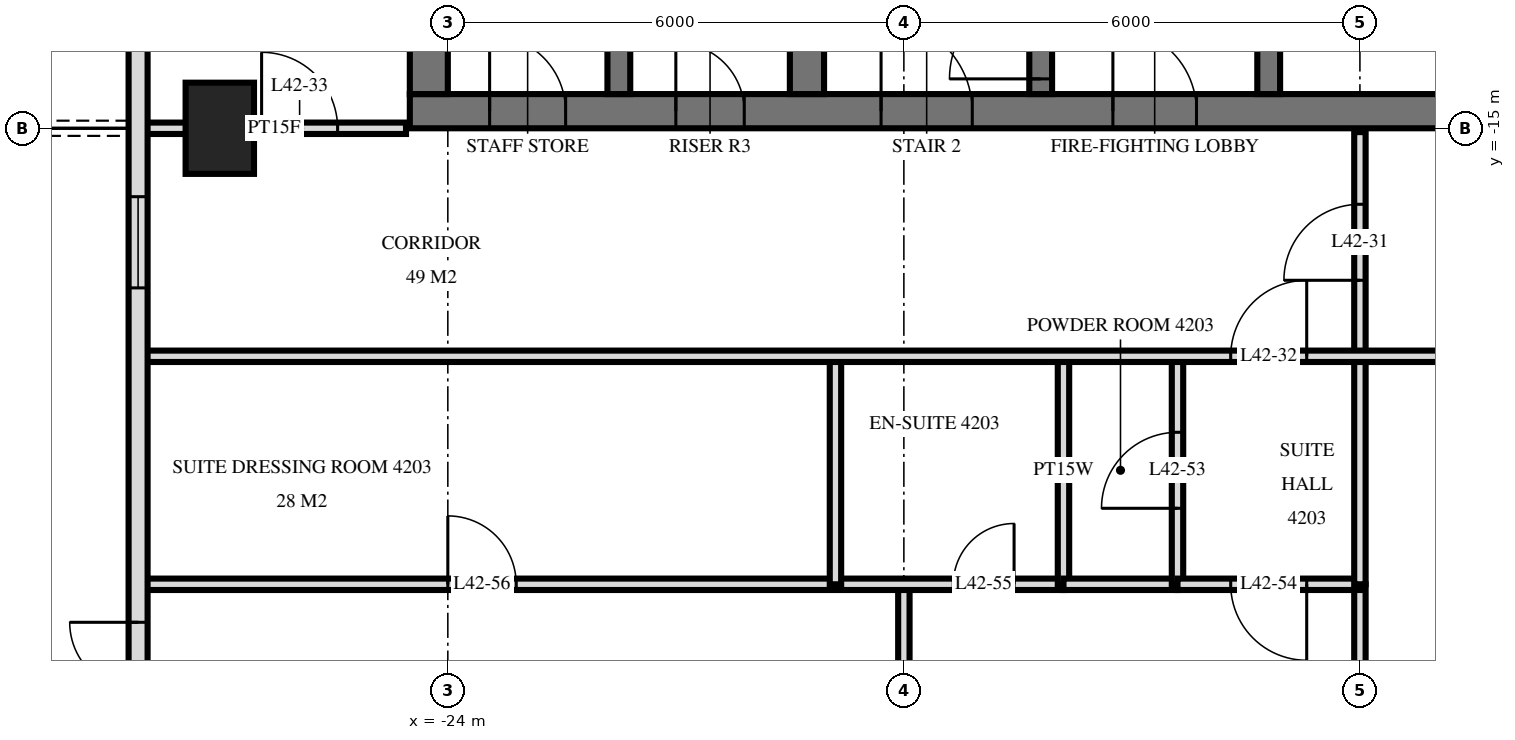
"""IFC4 building model, lengths in metres.
Left out: names, types, materials, properties, quantities, classifications, styles, units other than length and angle.
Written with IfcOpenShell. Run it as: python <this file> out.ifc"""

import sys

from ifc_helpers import new_model, si_unit, direction, frame, frame_2d, origin, origin_2d, place, context, subcontext, project, spatial, rectangle, extrude, element, fill, save


model = new_model("IFC4")
c1 = context("Model", 3, precision=1e-05, world=origin(), true_north=direction((0.0, 1.0)))
c2 = subcontext(c1, "Body", "Model", "MODEL_VIEW")
j1 = project(units=[si_unit("LENGTHUNIT", "METRE"), si_unit("PLANEANGLEUNIT", "RADIAN")], contexts=[c1])
p1 = place(None, origin())
s1 = spatial("IfcSite", under=j1, at=p1, CompositionType="ELEMENT")
p2 = place(p1, origin())
s2 = spatial("IfcBuilding", under=s1, at=p2, CompositionType="ELEMENT")
p3 = place(p2, frame((0.0, 0.0, 163.2)))
s3 = spatial("IfcBuildingStorey", under=s2, at=p3, CompositionType="ELEMENT", Elevation=163.2)
p4 = place(p3, frame((-27.0, -15.0, 0.0), z_axis=(0.0, 0.0, 1.0), x_axis=(0.0, 1.0, 0.0)))
e1 = element("IfcColumn", 1, at=p4, inside=s3, PredefinedType="COLUMN", context=c2, shape_type="SweptSolid", body=[
    extrude(rectangle(XDim=1.2, YDim=0.9, at=origin_2d()), origin(), (0.0, 0.0, 1.0), 3.6),
])
p5 = place(p3, frame((-24.5, -14.775, 0.0), z_axis=(0.0, 0.0, 1.0), x_axis=(1.0, 0.0, 0.0)))
e2 = element("IfcWall", 2, at=p5, inside=s3, PredefinedType="SHEAR", context=c2, shape_type="SweptSolid", body=[
    extrude(rectangle(XDim=14.5, YDim=0.45, at=frame_2d((7.25, 0.0))), origin(), (0.0, 0.0, 1.0), 3.6),
])
p6 = place(p5, frame((6.2, 0.0, 0.0)))
e3 = element("IfcOpeningElement", 3, at=p6, cuts=e2, PredefinedType="OPENING", context=c2, shape_type="SweptSolid", body=[
    extrude(rectangle(XDim=1.2, YDim=2.1, at=frame_2d((0.6, 1.05))), frame((0.0, 0.235, 0.0), z_axis=(0.0, -1.0, 0.0), x_axis=(1.0, 0.0, 0.0)), (0.0, 0.0, 1.0), 0.47),
])
p7 = place(p5, frame((9.25, 0.0, 0.0)))
e4 = element("IfcOpeningElement", 4, at=p7, cuts=e2, PredefinedType="OPENING", context=c2, shape_type="SweptSolid", body=[
    extrude(rectangle(XDim=1.1, YDim=2.1, at=frame_2d((0.55, 1.05))), frame((0.0, 0.235, 0.0), z_axis=(0.0, -1.0, 0.0), x_axis=(1.0, 0.0, 0.0)), (0.0, 0.0, 1.0), 0.47),
])
p8 = place(p5, frame((3.5, 0.0, 0.0)))
e5 = element("IfcOpeningElement", 5, at=p8, cuts=e2, PredefinedType="OPENING", context=c2, shape_type="SweptSolid", body=[
    extrude(rectangle(XDim=0.9, YDim=2.1, at=frame_2d((0.45, 1.05))), frame((0.0, 0.235, 0.0), z_axis=(0.0, -1.0, 0.0), x_axis=(1.0, 0.0, 0.0)), (0.0, 0.0, 1.0), 0.47),
])
p9 = place(p5, frame((1.05, 0.0, 0.0)))
e6 = element("IfcOpeningElement", 6, at=p9, cuts=e2, PredefinedType="OPENING", context=c2, shape_type="SweptSolid", body=[
    extrude(rectangle(XDim=1.0, YDim=2.1, at=frame_2d((0.5, 1.05))), frame((0.0, 0.235, 0.0), z_axis=(0.0, -1.0, 0.0), x_axis=(1.0, 0.0, 0.0)), (0.0, 0.0, 1.0), 0.47),
])
p10 = place(p3, frame((-24.25, -14.55, 0.0), z_axis=(0.0, 0.0, 1.0), x_axis=(0.0, 1.0, 0.0)))
e7 = element("IfcWall", 7, at=p10, inside=s3, PredefinedType="SHEAR", context=c2, shape_type="SweptSolid", body=[
    extrude(rectangle(XDim=14.1, YDim=0.5, at=frame_2d((7.05, 0.0))), origin(), (0.0, 0.0, 1.0), 3.6),
])
p11 = place(p3, frame((-13.2, -14.55, 0.0), z_axis=(0.0, 0.0, 1.0), x_axis=(0.0, 1.0, 0.0)))
e8 = element("IfcWall", 8, at=p11, inside=s3, PredefinedType="SHEAR", context=c2, shape_type="SweptSolid", body=[
    extrude(rectangle(XDim=5.4, YDim=0.3, at=frame_2d((2.7, 0.0))), origin(), (0.0, 0.0, 1.0), 3.6),
])
p12 = place(p11, frame((4.0, 0.0, 0.0)))
e9 = element("IfcOpeningElement", 9, at=p12, cuts=e8, PredefinedType="OPENING", context=c2, shape_type="SweptSolid", body=[
    extrude(rectangle(XDim=1.2, YDim=2.1, at=frame_2d((0.6, 1.05))), frame((0.0, 0.16, 0.0), z_axis=(0.0, -1.0, 0.0), x_axis=(1.0, 0.0, 0.0)), (0.0, 0.0, 1.0), 0.32),
])
p13 = place(p3, frame((-16.2, -14.55, 0.0), z_axis=(0.0, 0.0, 1.0), x_axis=(0.0, 1.0, 0.0)))
e10 = element("IfcWall", 10, at=p13, inside=s3, PredefinedType="SHEAR", context=c2, shape_type="SweptSolid", body=[
    extrude(rectangle(XDim=5.4, YDim=0.3, at=frame_2d((2.7, 0.0))), origin(), (0.0, 0.0, 1.0), 3.6),
])
p14 = place(p13, frame((0.2, 0.0, 0.0)))
e11 = element("IfcOpeningElement", 11, at=p14, cuts=e10, PredefinedType="OPENING", context=c2, shape_type="SweptSolid", body=[
    extrude(rectangle(XDim=1.2, YDim=2.1, at=frame_2d((0.6, 1.05))), frame((0.0, 0.16, 0.0), z_axis=(0.0, -1.0, 0.0), x_axis=(1.0, 0.0, 0.0)), (0.0, 0.0, 1.0), 0.32),
])
p15 = place(p3, frame((-19.275, -14.55, 0.0), z_axis=(0.0, 0.0, 1.0), x_axis=(0.0, 1.0, 0.0)))
e12 = element("IfcWall", 12, at=p15, inside=s3, PredefinedType="SHEAR", context=c2, shape_type="SweptSolid", body=[
    extrude(rectangle(XDim=5.4, YDim=0.45, at=frame_2d((2.7, 0.0))), origin(), (0.0, 0.0, 1.0), 3.6),
])
p16 = place(p3, frame((-21.75, -14.55, 0.0), z_axis=(0.0, 0.0, 1.0), x_axis=(0.0, 1.0, 0.0)))
e13 = element("IfcWall", 13, at=p16, inside=s3, PredefinedType="SHEAR", context=c2, shape_type="SweptSolid", body=[
    extrude(rectangle(XDim=5.4, YDim=0.3, at=frame_2d((2.7, 0.0))), origin(), (0.0, 0.0, 1.0), 3.6),
])
p17 = place(p3, frame((-28.075, -3.325, 0.0), z_axis=(0.0, 0.0, 1.0), x_axis=(0.0, -1.0, 0.0)))
e14 = element("IfcWall", 14, at=p17, inside=s3, PredefinedType="SOLIDWALL", context=c2, shape_type="SweptSolid", body=[
    extrude(rectangle(XDim=25.951, YDim=0.25, at=frame_2d((12.975, 0.0))), origin(), (0.0, 0.0, 1.0), 3.32),
])
p18 = place(p17, frame((6.65, 0.0, 0.0)))
e15 = element("IfcOpeningElement", 15, at=p18, cuts=e14, PredefinedType="OPENING", context=c2, shape_type="SweptSolid", body=[
    extrude(rectangle(XDim=1.8, YDim=2.4, at=frame_2d((0.9, 1.2))), frame((0.0, 0.135, 0.0), z_axis=(0.0, -1.0, 0.0), x_axis=(1.0, 0.0, 0.0)), (0.0, 0.0, 1.0), 0.27),
])
p19 = place(p17, frame((12.575, 0.0, 0.3)))
e16 = element("IfcOpeningElement", 16, at=p19, cuts=e14, PredefinedType="OPENING", context=c2, shape_type="SweptSolid", body=[
    extrude(rectangle(XDim=1.2, YDim=2.1, at=frame_2d((0.6, 1.05))), frame((0.0, 0.135, 0.0), z_axis=(0.0, -1.0, 0.0), x_axis=(1.0, 0.0, 0.0)), (0.0, 0.0, 1.0), 0.27),
])
p20 = place(p17, frame((18.175, 0.0, 0.0)))
e17 = element("IfcOpeningElement", 17, at=p20, cuts=e14, PredefinedType="OPENING", context=c2, shape_type="SweptSolid", body=[
    extrude(rectangle(XDim=1.8, YDim=2.4, at=frame_2d((0.9, 1.2))), frame((0.0, 0.135, 0.0), z_axis=(0.0, -1.0, 0.0), x_axis=(1.0, 0.0, 0.0)), (0.0, 0.0, 1.0), 0.27),
])
p21 = place(p17, frame((21.075, 0.0, 0.0)))
e18 = element("IfcOpeningElement", 18, at=p21, cuts=e14, PredefinedType="OPENING", context=c2, shape_type="SweptSolid", body=[
    extrude(rectangle(XDim=1.8, YDim=2.4, at=frame_2d((0.9, 1.2))), frame((0.0, 0.135, 0.0), z_axis=(0.0, -1.0, 0.0), x_axis=(1.0, 0.0, 0.0)), (0.0, 0.0, 1.0), 0.27),
])
p22 = place(p17, frame((23.825, 0.0, 0.3)))
e19 = element("IfcOpeningElement", 19, at=p22, cuts=e14, PredefinedType="OPENING", context=c2, shape_type="SweptSolid", body=[
    extrude(rectangle(XDim=1.8, YDim=2.1, at=frame_2d((0.9, 1.05))), frame((0.0, 0.135, 0.0), z_axis=(0.0, -1.0, 0.0), x_axis=(1.0, 0.0, 0.0)), (0.0, 0.0, 1.0), 0.27),
])
p23 = place(p3, frame((-12.0, -21.0, 0.0), z_axis=(0.0, 0.0, 1.0), x_axis=(0.0, 1.0, 0.0)))
e20 = element("IfcWall", 20, at=p23, inside=s3, PredefinedType="PARTITIONING", context=c2, shape_type="SweptSolid", body=[
    extrude(rectangle(XDim=5.95, YDim=0.15, at=frame_2d((2.975, 0.0))), origin(), (0.0, 0.0, 1.0), 3.32),
])
p24 = place(p23, frame((4.0, 0.0, 0.0)))
e21 = element("IfcOpeningElement", 21, at=p24, cuts=e20, PredefinedType="OPENING", context=c2, shape_type="SweptSolid", body=[
    extrude(rectangle(XDim=1.0, YDim=2.1, at=frame_2d((0.5, 1.05))), frame((0.0, 0.085, 0.0), z_axis=(0.0, -1.0, 0.0), x_axis=(1.0, 0.0, 0.0)), (0.0, 0.0, 1.0), 0.17),
])
p25 = place(p3, frame((-12.0, -33.62, 0.0), z_axis=(0.0, 0.0, 1.0), x_axis=(0.0, 1.0, 0.0)))
e22 = element("IfcWall", 22, at=p25, inside=s3, PredefinedType="PARTITIONING", context=c2, shape_type="SweptSolid", body=[
    extrude(rectangle(XDim=12.62, YDim=0.15, at=frame_2d((6.31, 0.0))), origin(), (0.0, 0.0, 1.0), 3.32),
])
p26 = place(p3, frame((-14.4, -21.0, 0.0), z_axis=(0.0, 0.0, 1.0), x_axis=(0.0, 1.0, 0.0)))
e23 = element("IfcWall", 23, at=p26, inside=s3, PredefinedType="PARTITIONING", context=c2, shape_type="SweptSolid", body=[
    extrude(rectangle(XDim=3.0, YDim=0.15, at=frame_2d((1.5, 0.0))), origin(), (0.0, 0.0, 1.0), 3.32),
])
p27 = place(p26, frame((1.0, 0.0, 0.0)))
e24 = element("IfcOpeningElement", 24, at=p27, cuts=e23, PredefinedType="OPENING", context=c2, shape_type="SweptSolid", body=[
    extrude(rectangle(XDim=1.0, YDim=2.1, at=frame_2d((0.5, 1.05))), frame((0.0, 0.085, 0.0), z_axis=(0.0, -1.0, 0.0), x_axis=(1.0, 0.0, 0.0)), (0.0, 0.0, 1.0), 0.17),
])
p28 = place(p3, frame((-15.9, -21.0, 0.0), z_axis=(0.0, 0.0, 1.0), x_axis=(0.0, 1.0, 0.0)))
e25 = element("IfcWall", 25, at=p28, inside=s3, PredefinedType="PLUMBINGWALL", context=c2, shape_type="SweptSolid", body=[
    extrude(rectangle(XDim=3.0, YDim=0.15, at=frame_2d((1.5, 0.0))), origin(), (0.0, 0.0, 1.0), 3.32),
])
p29 = place(p3, frame((-18.0, -33.62, 0.0), z_axis=(0.0, 0.0, 1.0), x_axis=(0.0, 1.0, 0.0)))
e26 = element("IfcWall", 26, at=p29, inside=s3, PredefinedType="PARTITIONING", context=c2, shape_type="SweptSolid", body=[
    extrude(rectangle(XDim=12.62, YDim=0.15, at=frame_2d((6.31, 0.0))), origin(), (0.0, 0.0, 1.0), 3.32),
])
p30 = place(p29, frame((5.79, 0.0, 0.0)))
e27 = element("IfcOpeningElement", 27, at=p30, cuts=e26, PredefinedType="OPENING", context=c2, shape_type="SweptSolid", body=[
    extrude(rectangle(XDim=0.9, YDim=2.1, at=frame_2d((0.45, 1.05))), frame((0.0, 0.085, 0.0), z_axis=(0.0, -1.0, 0.0), x_axis=(1.0, 0.0, 0.0)), (0.0, 0.0, 1.0), 0.17),
])
p31 = place(p3, frame((-18.9, -21.0, 0.0), z_axis=(0.0, 0.0, 1.0), x_axis=(0.0, 1.0, 0.0)))
e28 = element("IfcWall", 28, at=p31, inside=s3, PredefinedType="PARTITIONING", context=c2, shape_type="SweptSolid", body=[
    extrude(rectangle(XDim=3.0, YDim=0.15, at=frame_2d((1.5, 0.0))), origin(), (0.0, 0.0, 1.0), 3.32),
])
p32 = place(p3, frame((-14.4, -21.0, 0.0), z_axis=(0.0, 0.0, 1.0), x_axis=(1.0, 0.0, 0.0)))
e29 = element("IfcWall", 29, at=p32, inside=s3, PredefinedType="PARTITIONING", context=c2, shape_type="SweptSolid", body=[
    extrude(rectangle(XDim=2.4, YDim=0.15, at=frame_2d((1.2, 0.0))), origin(), (0.0, 0.0, 1.0), 3.32),
])
p33 = place(p32, frame((0.7, 0.0, 0.0)))
e30 = element("IfcOpeningElement", 30, at=p33, cuts=e29, PredefinedType="OPENING", context=c2, shape_type="SweptSolid", body=[
    extrude(rectangle(XDim=1.0, YDim=2.1, at=frame_2d((0.5, 1.05))), frame((0.0, 0.085, 0.0), z_axis=(0.0, -1.0, 0.0), x_axis=(1.0, 0.0, 0.0)), (0.0, 0.0, 1.0), 0.17),
])
p34 = place(p3, frame((-28.02, -21.0, 0.0), z_axis=(0.0, 0.0, 1.0), x_axis=(1.0, 0.0, 0.0)))
e31 = element("IfcWall", 31, at=p34, inside=s3, PredefinedType="PARTITIONING", context=c2, shape_type="SweptSolid", body=[
    extrude(rectangle(XDim=12.12, YDim=0.15, at=frame_2d((6.06, 0.0))), origin(), (0.0, 0.0, 1.0), 3.32),
])
p35 = place(p34, frame((10.67, 0.0, 0.0)))
e32 = element("IfcOpeningElement", 32, at=p35, cuts=e31, PredefinedType="OPENING", context=c2, shape_type="SweptSolid", body=[
    extrude(rectangle(XDim=0.8, YDim=2.1, at=frame_2d((0.4, 1.05))), frame((0.0, 0.085, 0.0), z_axis=(0.0, -1.0, 0.0), x_axis=(1.0, 0.0, 0.0)), (0.0, 0.0, 1.0), 0.17),
])
p36 = place(p34, frame((4.02, 0.0, 0.0)))
e33 = element("IfcOpeningElement", 33, at=p36, cuts=e31, PredefinedType="OPENING", context=c2, shape_type="SweptSolid", body=[
    extrude(rectangle(XDim=0.9, YDim=2.1, at=frame_2d((0.45, 1.05))), frame((0.0, 0.085, 0.0), z_axis=(0.0, -1.0, 0.0), x_axis=(1.0, 0.0, 0.0)), (0.0, 0.0, 1.0), 0.17),
])
p37 = place(p3, frame((-15.9, -21.0, 0.0), z_axis=(0.0, 0.0, 1.0), x_axis=(1.0, 0.0, 0.0)))
e34 = element("IfcWall", 34, at=p37, inside=s3, PredefinedType="PLUMBINGWALL", context=c2, shape_type="SweptSolid", body=[
    extrude(rectangle(XDim=1.5, YDim=0.15, at=frame_2d((0.75, 0.0))), origin(), (0.0, 0.0, 1.0), 3.32),
])
p38 = place(p3, frame((-28.02, -18.0, 0.0), z_axis=(0.0, 0.0, 1.0), x_axis=(1.0, 0.0, 0.0)))
e35 = element("IfcWall", 35, at=p38, inside=s3, PredefinedType="PARTITIONING", context=c2, shape_type="SweptSolid", body=[
    extrude(rectangle(XDim=56.04, YDim=0.15, at=frame_2d((28.02, 0.0))), origin(), (0.0, 0.0, 1.0), 3.32),
])
p39 = place(p38, frame((14.32, 0.0, 0.0)))
e36 = element("IfcOpeningElement", 36, at=p39, cuts=e35, PredefinedType="OPENING", context=c2, shape_type="SweptSolid", body=[
    extrude(rectangle(XDim=1.0, YDim=2.1, at=frame_2d((0.5, 1.05))), frame((0.0, 0.085, 0.0), z_axis=(0.0, -1.0, 0.0), x_axis=(1.0, 0.0, 0.0)), (0.0, 0.0, 1.0), 0.17),
])
p40 = place(p38, frame((40.17, 0.0, 0.0)))
e37 = element("IfcOpeningElement", 37, at=p40, cuts=e35, PredefinedType="OPENING", context=c2, shape_type="SweptSolid", body=[
    extrude(rectangle(XDim=1.0, YDim=2.1, at=frame_2d((0.5, 1.05))), frame((0.0, 0.085, 0.0), z_axis=(0.0, -1.0, 0.0), x_axis=(1.0, 0.0, 0.0)), (0.0, 0.0, 1.0), 0.17),
])
p41 = place(p38, frame((44.87, 0.0, 0.0)))
e38 = element("IfcOpeningElement", 38, at=p41, cuts=e35, PredefinedType="OPENING", context=c2, shape_type="SweptSolid", body=[
    extrude(rectangle(XDim=1.0, YDim=2.1, at=frame_2d((0.5, 1.05))), frame((0.0, 0.085, 0.0), z_axis=(0.0, -1.0, 0.0), x_axis=(1.0, 0.0, 0.0)), (0.0, 0.0, 1.0), 0.17),
])
p42 = place(p38, frame((46.72, 0.0, 0.0)))
e39 = element("IfcOpeningElement", 39, at=p42, cuts=e35, PredefinedType="OPENING", context=c2, shape_type="SweptSolid", body=[
    extrude(rectangle(XDim=1.0, YDim=2.1, at=frame_2d((0.5, 1.05))), frame((0.0, 0.085, 0.0), z_axis=(0.0, -1.0, 0.0), x_axis=(1.0, 0.0, 0.0)), (0.0, 0.0, 1.0), 0.17),
])
p43 = place(p38, frame((18.52, 0.0, 0.0)))
e40 = element("IfcOpeningElement", 40, at=p43, cuts=e35, PredefinedType="OPENING", context=c2, shape_type="SweptSolid", body=[
    extrude(rectangle(XDim=1.0, YDim=2.1, at=frame_2d((0.5, 1.05))), frame((0.0, 0.085, 0.0), z_axis=(0.0, -1.0, 0.0), x_axis=(1.0, 0.0, 0.0)), (0.0, 0.0, 1.0), 0.17),
])
p44 = place(p38, frame((24.52, 0.0, 0.0)))
e41 = element("IfcOpeningElement", 41, at=p44, cuts=e35, PredefinedType="OPENING", context=c2, shape_type="SweptSolid", body=[
    extrude(rectangle(XDim=1.0, YDim=2.1, at=frame_2d((0.5, 1.05))), frame((0.0, 0.085, 0.0), z_axis=(0.0, -1.0, 0.0), x_axis=(1.0, 0.0, 0.0)), (0.0, 0.0, 1.0), 0.17),
])
p45 = place(p38, frame((30.52, 0.0, 0.0)))
e42 = element("IfcOpeningElement", 42, at=p45, cuts=e35, PredefinedType="OPENING", context=c2, shape_type="SweptSolid", body=[
    extrude(rectangle(XDim=1.0, YDim=2.1, at=frame_2d((0.5, 1.05))), frame((0.0, 0.085, 0.0), z_axis=(0.0, -1.0, 0.0), x_axis=(1.0, 0.0, 0.0)), (0.0, 0.0, 1.0), 0.17),
])
p46 = place(p38, frame((36.52, 0.0, 0.0)))
e43 = element("IfcOpeningElement", 43, at=p46, cuts=e35, PredefinedType="OPENING", context=c2, shape_type="SweptSolid", body=[
    extrude(rectangle(XDim=1.0, YDim=2.1, at=frame_2d((0.5, 1.05))), frame((0.0, 0.085, 0.0), z_axis=(0.0, -1.0, 0.0), x_axis=(1.0, 0.0, 0.0)), (0.0, 0.0, 1.0), 0.17),
])
p47 = place(p3, frame((-28.02, -15.0, 0.0), z_axis=(0.0, 0.0, 1.0), x_axis=(1.0, 0.0, 0.0)))
e44 = element("IfcWall", 44, at=p47, inside=s3, PredefinedType="PARTITIONING", context=c2, shape_type="SweptSolid", body=[
    extrude(rectangle(XDim=3.47, YDim=0.15, at=frame_2d((1.735, 0.0))), origin(), (0.0, 0.0, 1.0), 3.32),
])
p48 = place(p47, frame((1.57, 0.0, 0.0)))
e45 = element("IfcOpeningElement", 45, at=p48, cuts=e44, PredefinedType="OPENING", context=c2, shape_type="SweptSolid", body=[
    extrude(rectangle(XDim=1.0, YDim=2.1, at=frame_2d((0.5, 1.05))), frame((0.0, 0.085, 0.0), z_axis=(0.0, -1.0, 0.0), x_axis=(1.0, 0.0, 0.0)), (0.0, 0.0, 1.0), 0.17),
])
p49 = place(p19, origin())
e46 = element("IfcWindow", 46, at=p49, inside=s3, PartitioningType="SINGLE_PANEL", PredefinedType="WINDOW", context=c2, shape_type="SweptSolid", body=[
    extrude(rectangle(XDim=1.2, YDim=2.1, at=frame_2d((0.6, 1.05))), frame((0.0, 0.03, 0.0), z_axis=(0.0, -1.0, 0.0), x_axis=(1.0, 0.0, 0.0)), (0.0, 0.0, 1.0), 0.06),
])
fill(e16, e46)
p50 = place(p20, frame((0.9, 0.0, 0.0), z_axis=(0.0, 0.0, 1.0), x_axis=(-1.0, 0.0, 0.0)))
e47 = element("IfcDoor", 47, at=p50, inside=s3, OperationType="DOUBLE_DOOR_SINGLE_SWING", PredefinedType="DOOR", context=c2, shape_type="SweptSolid", body=[
    extrude(rectangle(XDim=1.8, YDim=2.4, at=frame_2d((0.0, 1.2))), frame((0.0, -0.025, 0.0), z_axis=(0.0, 1.0, 0.0), x_axis=(-1.0, 0.0, 0.0)), (0.0, 0.0, 1.0), 0.05),
])
fill(e17, e47)
p51 = place(p6, origin())
e48 = element("IfcDoor", 48, at=p51, inside=s3, OperationType="SINGLE_SWING_RIGHT", PredefinedType="DOOR", context=c2, shape_type="SweptSolid", body=[
    extrude(rectangle(XDim=1.2, YDim=2.1, at=frame_2d((0.6, 1.05))), frame((0.0, 0.025, 0.0), z_axis=(0.0, -1.0, 0.0), x_axis=(1.0, 0.0, 0.0)), (0.0, 0.0, 1.0), 0.05),
])
fill(e3, e48)
p52 = place(p7, origin())
e49 = element("IfcDoor", 49, at=p52, inside=s3, OperationType="SINGLE_SWING_RIGHT", PredefinedType="DOOR", context=c2, shape_type="SweptSolid", body=[
    extrude(rectangle(XDim=1.1, YDim=2.1, at=frame_2d((0.55, 1.05))), frame((0.0, 0.025, 0.0), z_axis=(0.0, -1.0, 0.0), x_axis=(1.0, 0.0, 0.0)), (0.0, 0.0, 1.0), 0.05),
])
fill(e4, e49)
p53 = place(p8, origin())
e50 = element("IfcDoor", 50, at=p53, inside=s3, OperationType="SINGLE_SWING_RIGHT", PredefinedType="DOOR", context=c2, shape_type="SweptSolid", body=[
    extrude(rectangle(XDim=0.9, YDim=2.1, at=frame_2d((0.45, 1.05))), frame((0.0, 0.025, 0.0), z_axis=(0.0, -1.0, 0.0), x_axis=(1.0, 0.0, 0.0)), (0.0, 0.0, 1.0), 0.05),
])
fill(e5, e50)
p54 = place(p9, origin())
e51 = element("IfcDoor", 51, at=p54, inside=s3, OperationType="SINGLE_SWING_RIGHT", PredefinedType="DOOR", context=c2, shape_type="SweptSolid", body=[
    extrude(rectangle(XDim=1.0, YDim=2.1, at=frame_2d((0.5, 1.05))), frame((0.0, 0.025, 0.0), z_axis=(0.0, -1.0, 0.0), x_axis=(1.0, 0.0, 0.0)), (0.0, 0.0, 1.0), 0.05),
])
fill(e6, e51)
p55 = place(p14, origin())
e52 = element("IfcDoor", 52, at=p55, inside=s3, OperationType="SINGLE_SWING_RIGHT", PredefinedType="DOOR", context=c2, shape_type="SweptSolid", body=[
    extrude(rectangle(XDim=1.2, YDim=2.1, at=frame_2d((0.6, 1.05))), frame((0.0, 0.025, 0.0), z_axis=(0.0, -1.0, 0.0), x_axis=(1.0, 0.0, 0.0)), (0.0, 0.0, 1.0), 0.05),
])
fill(e11, e52)
p56 = place(p24, origin())
e53 = element("IfcDoor", 53, at=p56, inside=s3, OperationType="SINGLE_SWING_RIGHT", PredefinedType="DOOR", context=c2, shape_type="SweptSolid", body=[
    extrude(rectangle(XDim=1.0, YDim=2.1, at=frame_2d((0.5, 1.05))), frame((0.0, 0.025, 0.0), z_axis=(0.0, -1.0, 0.0), x_axis=(1.0, 0.0, 0.0)), (0.0, 0.0, 1.0), 0.05),
])
fill(e21, e53)
p57 = place(p39, origin())
e54 = element("IfcDoor", 54, at=p57, inside=s3, OperationType="SINGLE_SWING_LEFT", PredefinedType="DOOR", context=c2, shape_type="SweptSolid", body=[
    extrude(rectangle(XDim=1.0, YDim=2.1, at=frame_2d((0.5, 1.05))), frame((0.0, 0.025, 0.0), z_axis=(0.0, -1.0, 0.0), x_axis=(1.0, 0.0, 0.0)), (0.0, 0.0, 1.0), 0.05),
])
fill(e36, e54)
p58 = place(p48, origin())
e55 = element("IfcDoor", 55, at=p58, inside=s3, OperationType="SINGLE_SWING_RIGHT", PredefinedType="DOOR", context=c2, shape_type="SweptSolid", body=[
    extrude(rectangle(XDim=1.0, YDim=2.1, at=frame_2d((0.5, 1.05))), frame((0.0, 0.025, 0.0), z_axis=(0.0, -1.0, 0.0), x_axis=(1.0, 0.0, 0.0)), (0.0, 0.0, 1.0), 0.05),
])
fill(e45, e55)
p59 = place(p27, origin())
e56 = element("IfcDoor", 56, at=p59, inside=s3, OperationType="SINGLE_SWING_RIGHT", PredefinedType="DOOR", context=c2, shape_type="SweptSolid", body=[
    extrude(rectangle(XDim=1.0, YDim=2.1, at=frame_2d((0.5, 1.05))), frame((0.0, 0.025, 0.0), z_axis=(0.0, -1.0, 0.0), x_axis=(1.0, 0.0, 0.0)), (0.0, 0.0, 1.0), 0.05),
])
fill(e24, e56)
p60 = place(p33, frame((0.5, 0.0, 0.0), z_axis=(0.0, 0.0, 1.0), x_axis=(-1.0, 0.0, 0.0)))
e57 = element("IfcDoor", 57, at=p60, inside=s3, OperationType="SINGLE_SWING_RIGHT", PredefinedType="DOOR", context=c2, shape_type="SweptSolid", body=[
    extrude(rectangle(XDim=1.0, YDim=2.1, at=frame_2d((0.0, 1.05))), frame((0.0, -0.025, 0.0), z_axis=(0.0, 1.0, 0.0), x_axis=(-1.0, 0.0, 0.0)), (0.0, 0.0, 1.0), 0.05),
])
fill(e30, e57)
p61 = place(p35, origin())
e58 = element("IfcDoor", 58, at=p61, inside=s3, OperationType="SINGLE_SWING_LEFT", PredefinedType="DOOR", context=c2, shape_type="SweptSolid", body=[
    extrude(rectangle(XDim=0.8, YDim=2.1, at=frame_2d((0.4, 1.05))), frame((0.0, 0.025, 0.0), z_axis=(0.0, -1.0, 0.0), x_axis=(1.0, 0.0, 0.0)), (0.0, 0.0, 1.0), 0.05),
])
fill(e32, e58)
p62 = place(p36, origin())
e59 = element("IfcDoor", 59, at=p62, inside=s3, OperationType="SINGLE_SWING_RIGHT", PredefinedType="DOOR", context=c2, shape_type="SweptSolid", body=[
    extrude(rectangle(XDim=0.9, YDim=2.1, at=frame_2d((0.45, 1.05))), frame((0.0, 0.025, 0.0), z_axis=(0.0, -1.0, 0.0), x_axis=(1.0, 0.0, 0.0)), (0.0, 0.0, 1.0), 0.05),
])
fill(e33, e59)
save(model, sys.argv[1])
